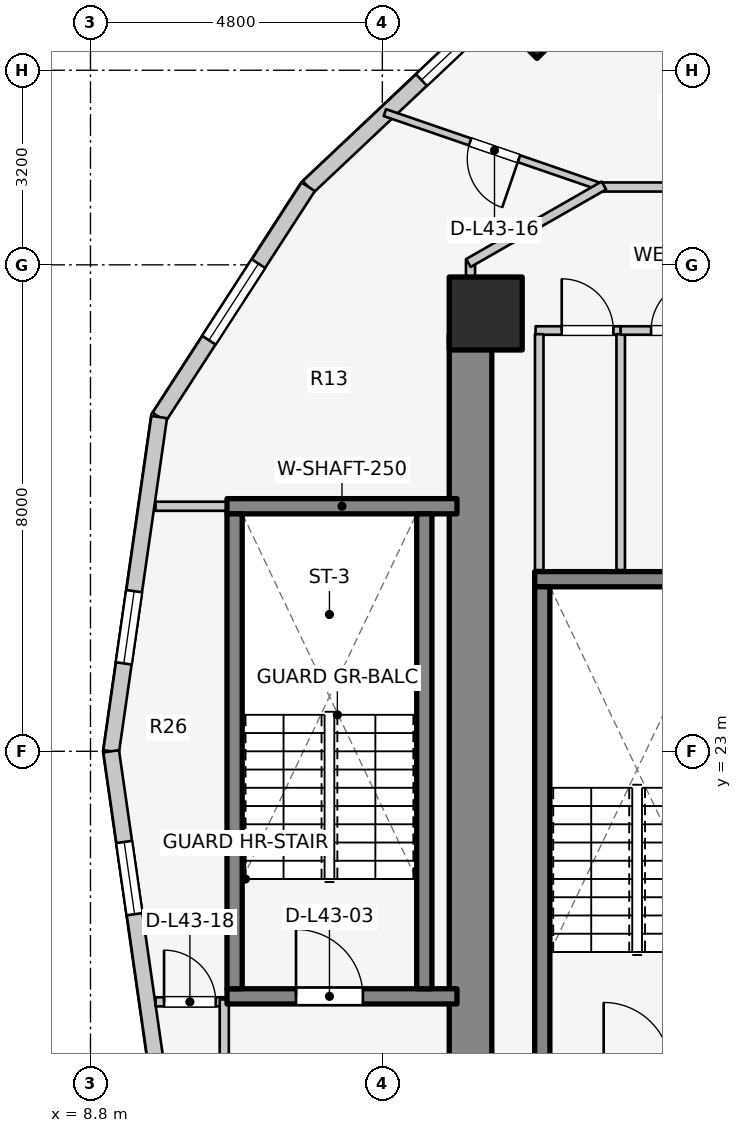
"""IFC4 building model, lengths in metres.
Left out: names, types, materials, properties, quantities, classifications, styles, units other than length and angle.
Written with IfcOpenShell. Run it as: python <this file> out.ifc"""

import sys

from ifc_helpers import new_model, si_unit, direction, frame, frame_2d, origin, origin_2d, place, context, subcontext, project, spatial, rectangle, extrude, element, fill, save


model = new_model("IFC4")
c1 = context("Model", 3, precision=1e-05, world=origin(), true_north=direction((0.0, 1.0)))
c2 = subcontext(c1, "Body", "Model", "MODEL_VIEW")
j1 = project(units=[si_unit("LENGTHUNIT", "METRE"), si_unit("PLANEANGLEUNIT", "RADIAN")], contexts=[c1])
p1 = place(None, origin())
s1 = spatial("IfcSite", under=j1, at=p1, CompositionType="ELEMENT")
p2 = place(p1, origin())
s2 = spatial("IfcBuilding", under=s1, at=p2, CompositionType="ELEMENT")
p3 = place(p2, frame((0.0, 0.0, 143.6)))
s3 = spatial("IfcBuildingStorey", under=s2, at=p3, CompositionType="ELEMENT", Elevation=143.6)
p4 = place(p3, frame((15.05, 17.05, 0.0), z_axis=(0.0, 0.0, 1.0), x_axis=(0.0, 1.0, 0.0)))
e1 = element("IfcWall", 1, at=p4, inside=s3, PredefinedType="SHEAR", context=c2, shape_type="SweptSolid", body=[
    extrude(rectangle(XDim=12.8, YDim=0.7, at=frame_2d((6.4, 0.0))), origin(), (0.0, 0.0, 1.0), 3.1),
])
p5 = place(p3, frame((16.105, 25.83, 0.0), z_axis=(0.0, 0.0, 1.0), x_axis=(1.0, 0.0, 0.0)))
e2 = element("IfcWall", 2, at=p5, inside=s3, PredefinedType="SOLIDWALL", context=c2, shape_type="SweptSolid", body=[
    extrude(rectangle(XDim=3.37, YDim=0.25, at=frame_2d((1.685, 0.0))), origin(), (0.0, 0.0, 1.0), 3.1),
])
p6 = place(p3, frame((16.23, 17.895, 0.0), z_axis=(0.0, 0.0, 1.0), x_axis=(0.0, 1.0, 0.0)))
e3 = element("IfcWall", 3, at=p6, inside=s3, PredefinedType="SOLIDWALL", context=c2, shape_type="SweptSolid", body=[
    extrude(rectangle(XDim=7.81, YDim=0.25, at=frame_2d((3.905, 0.0))), origin(), (0.0, 0.0, 1.0), 3.1),
])
p7 = place(p3, frame((11.045, 18.97, 0.0), z_axis=(0.0, 0.0, 1.0), x_axis=(1.0, 0.0, 0.0)))
e4 = element("IfcWall", 4, at=p7, inside=s3, PredefinedType="SOLIDWALL", context=c2, shape_type="SweptSolid", body=[
    extrude(rectangle(XDim=3.782, YDim=0.25, at=frame_2d((1.891, 0.0))), origin(), (0.0, 0.0, 1.0), 3.1),
])
p8 = place(p7, frame((1.135, 0.0, 0.0)))
e5 = element("IfcOpeningElement", 5, at=p8, cuts=e4, PredefinedType="OPENING", context=c2, shape_type="SweptSolid", body=[
    extrude(rectangle(XDim=1.1, YDim=2.1, at=frame_2d((0.55, 1.05))), frame((0.0, 0.135, 0.0), z_axis=(0.0, -1.0, 0.0), x_axis=(1.0, 0.0, 0.0)), (0.0, 0.0, 1.0), 0.27),
])
p9 = place(p3, frame((11.045, 27.03, 0.0), z_axis=(0.0, 0.0, 1.0), x_axis=(1.0, 0.0, 0.0)))
e6 = element("IfcWall", 6, at=p9, inside=s3, PredefinedType="SOLIDWALL", context=c2, shape_type="SweptSolid", body=[
    extrude(rectangle(XDim=3.782, YDim=0.25, at=frame_2d((1.891, 0.0))), origin(), (0.0, 0.0, 1.0), 3.1),
])
for number, where, z_axis, x_axis in (
    (7, (11.17, 19.095, 0.0), (0.0, 0.0, 1.0), (0.0, 1.0, 0.0)),
    (8, (14.29, 19.095, 0.0), (0.0, 0.0, 1.0), (0.0, 1.0, 0.0)),
):
    element("IfcWall", number, at=place(p3, frame(where, z_axis=z_axis, x_axis=x_axis)), inside=s3, PredefinedType="SOLIDWALL", context=c2, shape_type="SweptSolid", body=[
        extrude(rectangle(XDim=7.81, YDim=0.25, at=frame_2d((3.905, 0.0))), origin(), (0.0, 0.0, 1.0), 3.1),
    ])
p10 = place(p3, frame((15.3, 30.2, 0.0), z_axis=(0.0, 0.0, 1.0), x_axis=(1.0, 0.0, 0.0)))
e9 = element("IfcColumn", 9, at=p10, inside=s3, PredefinedType="COLUMN", context=c2, shape_type="SweptSolid", body=[
    extrude(rectangle(XDim=1.2, YDim=1.2, at=origin_2d()), origin(), (0.0, 0.0, 1.0), 3.1),
])
p11 = place(p3, frame((16.143, 35.031, 0.0), z_axis=(0.0, 0.0, 1.0), x_axis=(-0.707106781187, 0.707106781187, 0.0)))
e10 = element("IfcColumn", 10, at=p11, inside=s3, PredefinedType="COLUMN", context=c2, shape_type="SweptSolid", body=[
    extrude(rectangle(XDim=0.9, YDim=0.9, at=origin_2d()), origin(), (0.0, 0.0, 1.0), 3.1),
])
p12 = place(p3, frame((15.731, 35.441, 0.0), z_axis=(0.0, 0.0, 1.0), x_axis=(-0.727667301037, -0.68593024354, 0.0)))
e11 = element("IfcWall", 11, at=p12, inside=s3, PredefinedType="STANDARD", context=c2, shape_type="SweptSolid", body=[
    extrude(rectangle(XDim=4.604, YDim=0.26, at=frame_2d((2.302, 0.0))), origin(), (0.0, 0.0, 1.0), 2.85),
])
p13 = place(p12, frame((0.844, 0.0, 0.75)))
e12 = element("IfcOpeningElement", 12, at=p13, cuts=e11, PredefinedType="OPENING", context=c2, shape_type="SweptSolid", body=[
    extrude(rectangle(XDim=1.2, YDim=1.5, at=frame_2d((0.6, 0.75))), frame((0.0, 0.14, 0.0), z_axis=(0.0, -1.0, 0.0), x_axis=(1.0, 0.0, 0.0)), (0.0, 0.0, 1.0), 0.28),
])
p14 = place(p3, frame((12.381, 32.284, 0.0), z_axis=(0.0, 0.0, 1.0), x_axis=(-0.543358984534, -0.839500454989, 0.0)))
e13 = element("IfcWall", 13, at=p14, inside=s3, PredefinedType="STANDARD", context=c2, shape_type="SweptSolid", body=[
    extrude(rectangle(XDim=4.511, YDim=0.26, at=frame_2d((2.256, 0.0))), origin(), (0.0, 0.0, 1.0), 2.85),
])
p15 = place(p14, frame((1.506, 0.0, 0.75)))
e14 = element("IfcOpeningElement", 14, at=p15, cuts=e13, PredefinedType="OPENING", context=c2, shape_type="SweptSolid", body=[
    extrude(rectangle(XDim=1.5, YDim=1.6, at=frame_2d((0.75, 0.8))), frame((0.0, 0.14, 0.0), z_axis=(0.0, -1.0, 0.0), x_axis=(1.0, 0.0, 0.0)), (0.0, 0.0, 1.0), 0.28),
])
p16 = place(p3, frame((9.93, 28.497, 0.0), z_axis=(0.0, 0.0, 1.0), x_axis=(-0.142227632286, -0.989833976288, 0.0)))
e15 = element("IfcWall", 15, at=p16, inside=s3, PredefinedType="STANDARD", context=c2, shape_type="SweptSolid", body=[
    extrude(rectangle(XDim=5.553, YDim=0.26, at=frame_2d((2.776, 0.0))), origin(), (0.0, 0.0, 1.0), 2.85),
])
p17 = place(p16, frame((2.892, 0.0, 0.75)))
e16 = element("IfcOpeningElement", 16, at=p17, cuts=e15, PredefinedType="OPENING", context=c2, shape_type="SweptSolid", body=[
    extrude(rectangle(XDim=1.2, YDim=1.5, at=frame_2d((0.6, 0.75))), frame((0.0, 0.14, 0.0), z_axis=(0.0, -1.0, 0.0), x_axis=(1.0, 0.0, 0.0)), (0.0, 0.0, 1.0), 0.28),
])
p18 = place(p3, frame((9.14, 23.0, 0.0), z_axis=(0.0, 0.0, 1.0), x_axis=(0.142227632286, -0.989833976288, 0.0)))
e17 = element("IfcWall", 17, at=p18, inside=s3, PredefinedType="STANDARD", context=c2, shape_type="SweptSolid", body=[
    extrude(rectangle(XDim=5.553, YDim=0.26, at=frame_2d((2.776, 0.0))), origin(), (0.0, 0.0, 1.0), 2.85),
])
p19 = place(p18, frame((1.506, 0.0, 0.75)))
e18 = element("IfcOpeningElement", 18, at=p19, cuts=e17, PredefinedType="OPENING", context=c2, shape_type="SweptSolid", body=[
    extrude(rectangle(XDim=1.2, YDim=1.5, at=frame_2d((0.6, 0.75))), frame((0.0, 0.14, 0.0), z_axis=(0.0, -1.0, 0.0), x_axis=(1.0, 0.0, 0.0)), (0.0, 0.0, 1.0), 0.28),
])
p20 = place(p3, frame((16.12, 29.92, 0.0), z_axis=(0.0, 0.0, 1.0), x_axis=(1.0, 0.0, 0.0)))
e19 = element("IfcWall", 19, at=p20, inside=s3, PredefinedType="PLUMBINGWALL", context=c2, shape_type="SweptSolid", body=[
    extrude(rectangle(XDim=1.4, YDim=0.14, at=frame_2d((0.7, 0.0))), origin(), (0.0, 0.0, 1.0), 2.855),
])
p21 = place(p20, frame((0.43, 0.0, 0.0)))
e20 = element("IfcOpeningElement", 20, at=p21, cuts=e19, PredefinedType="OPENING", context=c2, shape_type="SweptSolid", body=[
    extrude(rectangle(XDim=0.85, YDim=2.05, at=frame_2d((0.425, 1.025))), frame((0.0, 0.08, 0.0), z_axis=(0.0, -1.0, 0.0), x_axis=(1.0, 0.0, 0.0)), (0.0, 0.0, 1.0), 0.16),
])
for number, where, z_axis, x_axis in (
    (21, (16.18, 25.98, 0.0), (0.0, 0.0, 1.0), (0.0, 1.0, 0.0)),
    (22, (17.52, 25.98, 0.0), (0.0, 0.0, 1.0), (0.0, 1.0, 0.0)),
):
    element("IfcWall", number, at=place(p3, frame(where, z_axis=z_axis, x_axis=x_axis)), inside=s3, PredefinedType="PLUMBINGWALL", context=c2, shape_type="SweptSolid", body=[
        extrude(rectangle(XDim=3.88, YDim=0.14, at=frame_2d((1.94, 0.0))), origin(), (0.0, 0.0, 1.0), 2.855),
    ])
p22 = place(p3, frame((17.52, 29.92, 0.0), z_axis=(0.0, 0.0, 1.0), x_axis=(1.0, 0.0, 0.0)))
e23 = element("IfcWall", 23, at=p22, inside=s3, PredefinedType="PLUMBINGWALL", context=c2, shape_type="SweptSolid", body=[
    extrude(rectangle(XDim=1.9, YDim=0.14, at=frame_2d((0.95, 0.0))), origin(), (0.0, 0.0, 1.0), 2.855),
])
p23 = place(p22, frame((0.5, 0.0, 0.0)))
e24 = element("IfcOpeningElement", 24, at=p23, cuts=e23, PredefinedType="OPENING", context=c2, shape_type="SweptSolid", body=[
    extrude(rectangle(XDim=0.85, YDim=2.05, at=frame_2d((0.425, 1.025))), frame((0.0, 0.08, 0.0), z_axis=(0.0, -1.0, 0.0), x_axis=(1.0, 0.0, 0.0)), (0.0, 0.0, 1.0), 0.16),
])
p24 = place(p3, frame((9.87, 27.03, 0.0), z_axis=(0.0, 0.0, 1.0), x_axis=(1.0, 0.0, 0.0)))
e25 = element("IfcWall", 25, at=p24, inside=s3, PredefinedType="PARTITIONING", context=c2, shape_type="SweptSolid", body=[
    extrude(rectangle(XDim=1.17, YDim=0.15, at=frame_2d((0.585, 0.0))), origin(), (0.0, 0.0, 1.0), 2.855),
])
p25 = place(p3, frame((15.05, 29.8, 0.0), z_axis=(0.0, 0.0, 1.0), x_axis=(0.0, 1.0, 0.0)))
e26 = element("IfcWall", 26, at=p25, inside=s3, PredefinedType="PARTITIONING", context=c2, shape_type="SweptSolid", body=[
    extrude(rectangle(XDim=1.29, YDim=0.15, at=frame_2d((0.645, 0.0))), origin(), (0.0, 0.0, 1.0), 2.855),
])
p26 = place(p3, frame((17.247, 32.264, 0.0), z_axis=(0.0, 0.0, 1.0), x_axis=(-0.945683523506, 0.325088716151, 0.0)))
e27 = element("IfcWall", 27, at=p26, inside=s3, PredefinedType="MOVABLE", context=c2, shape_type="SweptSolid", body=[
    extrude(rectangle(XDim=3.813, YDim=0.12, at=frame_2d((1.906, 0.0))), origin(), (0.0, 0.0, 1.0), 2.22),
])
p27 = place(p26, frame((1.481, 0.0, 0.0)))
e28 = element("IfcOpeningElement", 28, at=p27, cuts=e27, PredefinedType="OPENING", context=c2, shape_type="SweptSolid", body=[
    extrude(rectangle(XDim=0.85, YDim=2.05, at=frame_2d((0.425, 1.025))), frame((0.0, 0.07, 0.0), z_axis=(0.0, -1.0, 0.0), x_axis=(1.0, 0.0, 0.0)), (0.0, 0.0, 1.0), 0.14),
])
p28 = place(p3, frame((17.15, 32.28, 0.0), z_axis=(0.0, 0.0, 1.0), x_axis=(1.0, 0.0, 0.0)))
e29 = element("IfcWall", 29, at=p28, inside=s3, PredefinedType="PARTITIONING", context=c2, shape_type="SweptSolid", body=[
    extrude(rectangle(XDim=7.52, YDim=0.15, at=frame_2d((3.76, 0.0))), origin(), (0.0, 0.0, 1.0), 2.299),
])
p29 = place(p28, frame((1.3, 0.0, 0.0)))
e30 = element("IfcOpeningElement", 30, at=p29, cuts=e29, PredefinedType="OPENING", context=c2, shape_type="SweptSolid", body=[
    extrude(rectangle(XDim=0.9, YDim=2.1, at=frame_2d((0.45, 1.05))), frame((0.0, 0.085, 0.0), z_axis=(0.0, -1.0, 0.0), x_axis=(1.0, 0.0, 0.0)), (0.0, 0.0, 1.0), 0.17),
])
p30 = place(p3, frame((17.243, 32.305, 0.0), z_axis=(0.0, 0.0, 1.0), x_axis=(-0.867991349648, -0.496579315857, 0.0)))
e31 = element("IfcWall", 31, at=p30, inside=s3, PredefinedType="PARTITIONING", context=c2, shape_type="SweptSolid", body=[
    extrude(rectangle(XDim=2.567, YDim=0.15, at=frame_2d((1.283, 0.0))), origin(), (0.0, 0.0, 1.0), 2.22),
])
p31 = place(p3, frame((9.87, 18.88, 0.0), z_axis=(0.0, 0.0, 1.0), x_axis=(1.0, 0.0, 0.0)))
e32 = element("IfcWall", 32, at=p31, inside=s3, PredefinedType="PARTITIONING", context=c2, shape_type="SweptSolid", body=[
    extrude(rectangle(XDim=1.17, YDim=0.15, at=frame_2d((0.585, 0.0))), origin(), (0.0, 0.0, 1.0), 2.855),
])
p32 = place(p31, frame((0.14, 0.0, 0.0)))
e33 = element("IfcOpeningElement", 33, at=p32, cuts=e32, PredefinedType="OPENING", context=c2, shape_type="SweptSolid", body=[
    extrude(rectangle(XDim=0.85, YDim=2.05, at=frame_2d((0.425, 1.025))), frame((0.0, 0.085, 0.0), z_axis=(0.0, -1.0, 0.0), x_axis=(1.0, 0.0, 0.0)), (0.0, 0.0, 1.0), 0.17),
])
p33 = place(p3, frame((11.0, 15.91, 0.0), z_axis=(0.0, 0.0, 1.0), x_axis=(0.0, 1.0, 0.0)))
e34 = element("IfcWall", 34, at=p33, inside=s3, PredefinedType="PARTITIONING", context=c2, shape_type="SweptSolid", body=[
    extrude(rectangle(XDim=3.01, YDim=0.15, at=frame_2d((1.505, 0.0))), origin(), (0.0, 0.0, 1.0), 2.855),
])
p34 = place(p13, origin())
e35 = element("IfcWindow", 35, at=p34, inside=s3, PartitioningType="SINGLE_PANEL", PredefinedType="WINDOW", context=c2, shape_type="SweptSolid", body=[
    extrude(rectangle(XDim=1.2, YDim=1.5, at=frame_2d((0.6, 0.75))), frame((0.0, 0.03, 0.0), z_axis=(0.0, -1.0, 0.0), x_axis=(1.0, 0.0, 0.0)), (0.0, 0.0, 1.0), 0.06),
])
fill(e12, e35)
p35 = place(p15, origin())
e36 = element("IfcWindow", 36, at=p35, inside=s3, PartitioningType="SINGLE_PANEL", PredefinedType="WINDOW", context=c2, shape_type="SweptSolid", body=[
    extrude(rectangle(XDim=1.5, YDim=1.6, at=frame_2d((0.75, 0.8))), frame((0.0, 0.03, 0.0), z_axis=(0.0, -1.0, 0.0), x_axis=(1.0, 0.0, 0.0)), (0.0, 0.0, 1.0), 0.06),
])
fill(e14, e36)
p36 = place(p17, origin())
e37 = element("IfcWindow", 37, at=p36, inside=s3, PartitioningType="SINGLE_PANEL", PredefinedType="WINDOW", context=c2, shape_type="SweptSolid", body=[
    extrude(rectangle(XDim=1.2, YDim=1.5, at=frame_2d((0.6, 0.75))), frame((0.0, 0.03, 0.0), z_axis=(0.0, -1.0, 0.0), x_axis=(1.0, 0.0, 0.0)), (0.0, 0.0, 1.0), 0.06),
])
fill(e16, e37)
p37 = place(p19, origin())
e38 = element("IfcWindow", 38, at=p37, inside=s3, PartitioningType="SINGLE_PANEL", PredefinedType="WINDOW", context=c2, shape_type="SweptSolid", body=[
    extrude(rectangle(XDim=1.2, YDim=1.5, at=frame_2d((0.6, 0.75))), frame((0.0, 0.03, 0.0), z_axis=(0.0, -1.0, 0.0), x_axis=(1.0, 0.0, 0.0)), (0.0, 0.0, 1.0), 0.06),
])
fill(e18, e38)
p38 = place(p8, origin())
e39 = element("IfcDoor", 39, at=p38, inside=s3, OperationType="SINGLE_SWING_LEFT", PredefinedType="DOOR", context=c2, shape_type="SweptSolid", body=[
    extrude(rectangle(XDim=1.1, YDim=2.1, at=frame_2d((0.55, 1.05))), frame((0.0, 0.025, 0.0), z_axis=(0.0, -1.0, 0.0), x_axis=(1.0, 0.0, 0.0)), (0.0, 0.0, 1.0), 0.05),
])
fill(e5, e39)
p39 = place(p21, origin())
e40 = element("IfcDoor", 40, at=p39, inside=s3, OperationType="SINGLE_SWING_LEFT", PredefinedType="DOOR", context=c2, shape_type="SweptSolid", body=[
    extrude(rectangle(XDim=0.85, YDim=2.05, at=frame_2d((0.425, 1.025))), frame((0.0, 0.025, 0.0), z_axis=(0.0, -1.0, 0.0), x_axis=(1.0, 0.0, 0.0)), (0.0, 0.0, 1.0), 0.05),
])
fill(e20, e40)
p40 = place(p23, origin())
e41 = element("IfcDoor", 41, at=p40, inside=s3, OperationType="SINGLE_SWING_RIGHT", PredefinedType="DOOR", context=c2, shape_type="SweptSolid", body=[
    extrude(rectangle(XDim=0.85, YDim=2.05, at=frame_2d((0.425, 1.025))), frame((0.0, 0.025, 0.0), z_axis=(0.0, -1.0, 0.0), x_axis=(1.0, 0.0, 0.0)), (0.0, 0.0, 1.0), 0.05),
])
fill(e24, e41)
p41 = place(p27, origin())
e42 = element("IfcDoor", 42, at=p41, inside=s3, OperationType="SINGLE_SWING_LEFT", PredefinedType="DOOR", context=c2, shape_type="SweptSolid", body=[
    extrude(rectangle(XDim=0.85, YDim=2.05, at=frame_2d((0.425, 1.025))), frame((0.0, 0.025, 0.0), z_axis=(0.0, -1.0, 0.0), x_axis=(1.0, 0.0, 0.0)), (0.0, 0.0, 1.0), 0.05),
])
fill(e28, e42)
p42 = place(p32, origin())
e43 = element("IfcDoor", 43, at=p42, inside=s3, OperationType="SINGLE_SWING_LEFT", PredefinedType="DOOR", context=c2, shape_type="SweptSolid", body=[
    extrude(rectangle(XDim=0.85, YDim=2.05, at=frame_2d((0.425, 1.025))), frame((0.0, 0.025, 0.0), z_axis=(0.0, -1.0, 0.0), x_axis=(1.0, 0.0, 0.0)), (0.0, 0.0, 1.0), 0.05),
])
fill(e33, e43)
save(model, sys.argv[1])
